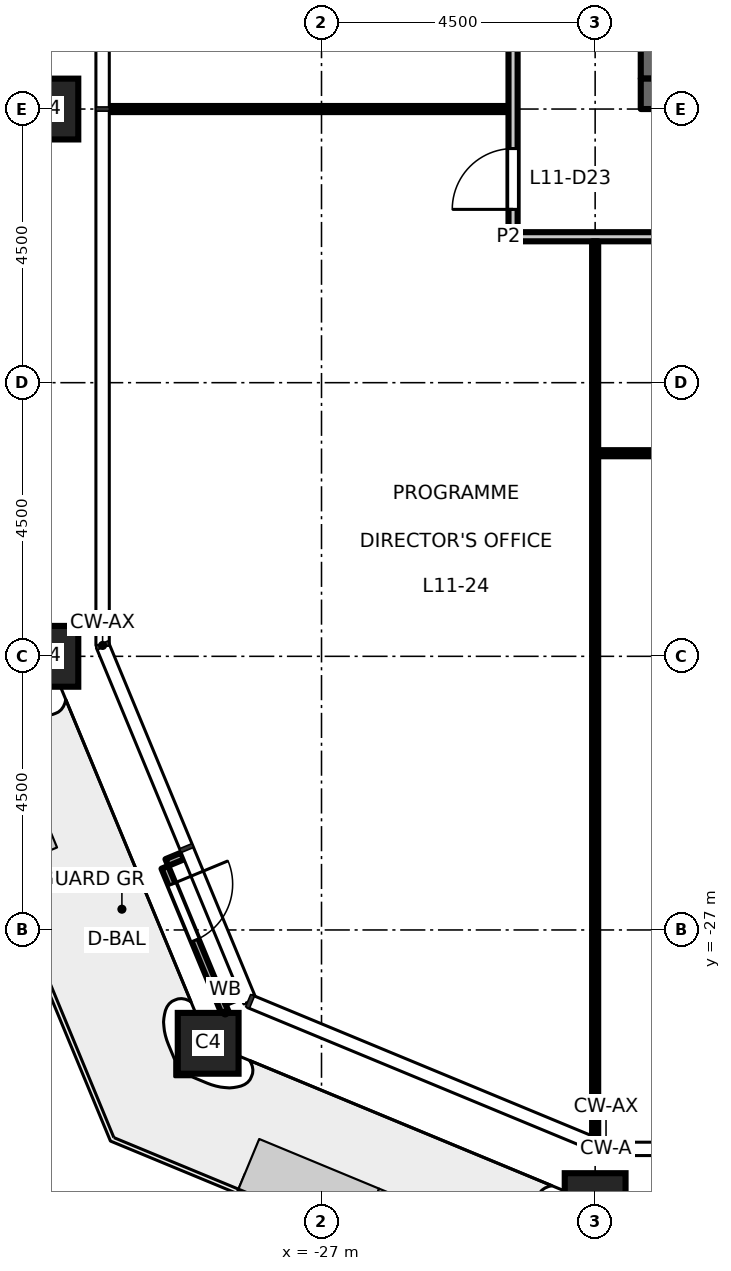
"""IFC4 building model, lengths in metres.
Left out: names, types, materials, properties, quantities, classifications, styles, units other than length and angle.
Written with IfcOpenShell. Run it as: python <this file> out.ifc"""

import sys

from ifc_helpers import new_model, si_unit, direction, frame, frame_2d, origin, origin_2d, place, context, subcontext, project, spatial, rectangle, hollow_rectangle, extrude, element, fill, save


model = new_model("IFC4")
c1 = context("Model", 3, precision=1e-05, world=origin(), true_north=direction((0.0, 1.0)))
c2 = subcontext(c1, "Body", "Model", "MODEL_VIEW")
j1 = project(units=[si_unit("LENGTHUNIT", "METRE"), si_unit("PLANEANGLEUNIT", "RADIAN")], contexts=[c1])
p1 = place(None, origin())
s1 = spatial("IfcSite", under=j1, at=p1, CompositionType="ELEMENT")
p2 = place(p1, origin())
s2 = spatial("IfcBuilding", under=s1, at=p2, CompositionType="ELEMENT")
p3 = place(p2, frame((0.0, 0.0, 53.7)))
s3 = spatial("IfcBuildingStorey", under=s2, at=p3, CompositionType="ELEMENT", Elevation=53.7)
for number, where, z_axis, x_axis in (
    (1, (-22.5, -31.5, 0.0), (0.0, 0.0, 1.0), (1.0, 0.0, 0.0)),
    (2, (-31.5, -13.5, 0.0), (0.0, 0.0, 1.0), (1.0, 0.0, 0.0)),
    (3, (-31.5, -22.5, 0.0), (0.0, 0.0, 1.0), (1.0, 0.0, 0.0)),
    (4, (-28.864, -28.864, 0.0), (0.0, 0.0, 1.0), (1.0, 0.0, 0.0)),
):
    element("IfcColumn", number, at=place(p3, frame(where, z_axis=z_axis, x_axis=x_axis)), inside=s3, PredefinedType="COLUMN", context=c2, shape_type="SweptSolid", body=[
        extrude(hollow_rectangle(XDim=1.0, YDim=1.0, WallThickness=0.06, at=origin_2d()), origin(), (0.0, 0.0, 1.0), 4.5),
    ])
p4 = place(p3, frame((-21.5, -13.0, 0.0), z_axis=(0.0, 0.0, 1.0), x_axis=(0.0, 1.0, 0.0)))
e5 = element("IfcWall", 5, at=p4, inside=s3, PredefinedType="SHEAR", context=c2, shape_type="SweptSolid", body=[
    extrude(rectangle(XDim=26.0, YDim=0.5, at=frame_2d((13.0, 0.0))), origin(), (0.0, 0.0, 1.0), 4.35),
])
p5 = place(p4, frame((16.825, 0.0, 0.0)))
e6 = element("IfcOpeningElement", 6, at=p5, cuts=e5, PredefinedType="OPENING", context=c2, shape_type="SweptSolid", body=[
    extrude(rectangle(XDim=1.8, YDim=2.1, at=frame_2d((0.9, 1.05))), frame((0.0, 0.26, 0.0), z_axis=(0.0, -1.0, 0.0), x_axis=(1.0, 0.0, 0.0)), (0.0, 0.0, 1.0), 0.52),
])
p6 = place(p4, frame((7.375, 0.0, 0.0)))
e7 = element("IfcOpeningElement", 7, at=p6, cuts=e5, PredefinedType="OPENING", context=c2, shape_type="SweptSolid", body=[
    extrude(rectangle(XDim=1.8, YDim=2.1, at=frame_2d((0.9, 1.05))), frame((0.0, 0.26, 0.0), z_axis=(0.0, -1.0, 0.0), x_axis=(1.0, 0.0, 0.0)), (0.0, 0.0, 1.0), 0.52),
])
p7 = place(p4, frame((23.4, 0.0, 0.0)))
e8 = element("IfcOpeningElement", 8, at=p7, cuts=e5, PredefinedType="OPENING", context=c2, shape_type="SweptSolid", body=[
    extrude(rectangle(XDim=0.9, YDim=2.1, at=frame_2d((0.45, 1.05))), frame((0.0, 0.26, 0.0), z_axis=(0.0, -1.0, 0.0), x_axis=(1.0, 0.0, 0.0)), (0.0, 0.0, 1.0), 0.52),
])
p8 = place(p3, frame((-8.25, -13.25, 0.0), z_axis=(0.0, 0.0, 1.0), x_axis=(-1.0, 0.0, 0.0)))
e9 = element("IfcWall", 9, at=p8, inside=s3, PredefinedType="SHEAR", context=c2, shape_type="SweptSolid", body=[
    extrude(rectangle(XDim=13.5, YDim=0.5, at=frame_2d((6.75, 0.0))), origin(), (0.0, 0.0, 1.0), 4.35),
])
p9 = place(p3, frame((-29.285, -25.783, 0.0), z_axis=(0.0, 0.0, 1.0), x_axis=(-0.923772220778, -0.382942403136, 0.0)))
e10 = element("IfcWall", 10, at=p9, inside=s3, PredefinedType="STANDARD", context=c2, shape_type="SweptSolid", body=[
    extrude(rectangle(XDim=0.28, YDim=0.12, at=frame_2d((0.14, 0.0))), origin(), (0.0, 0.0, 1.0), 4.35),
])
p10 = place(p3, frame((-28.343, -28.058, 0.0), z_axis=(0.0, 0.0, 1.0), x_axis=(-0.923899985553, -0.382634050621, 0.0)))
e11 = element("IfcWall", 11, at=p10, inside=s3, PredefinedType="STANDARD", context=c2, shape_type="SweptSolid", body=[
    extrude(rectangle(XDim=0.28, YDim=0.12, at=frame_2d((0.14, 0.0))), origin(), (0.0, 0.0, 1.0), 4.35),
])
p11 = place(p3, frame((-29.576, -25.969, 0.0), z_axis=(0.0, 0.0, 1.0), x_axis=(0.382648460137, -0.923894017707, 0.0)))
e12 = element("IfcWall", 12, at=p11, inside=s3, PredefinedType="STANDARD", context=c2, shape_type="SweptSolid", body=[
    extrude(rectangle(XDim=2.592, YDim=0.12, at=frame_2d((1.296, 0.0))), origin(), (0.0, 0.0, 1.0), 4.35),
])
p12 = place(p11, frame((0.3, 0.0, 0.0)))
e13 = element("IfcOpeningElement", 13, at=p12, cuts=e12, PredefinedType="OPENING", context=c2, shape_type="SweptSolid", body=[
    extrude(rectangle(XDim=1.0, YDim=2.4, at=frame_2d((0.5, 1.2))), frame((0.0, 0.07, 0.0), z_axis=(0.0, -1.0, 0.0), x_axis=(1.0, 0.0, 0.0)), (0.0, 0.0, 1.0), 0.14),
])
p13 = place(p3, frame((-22.45, -19.16, 0.0), z_axis=(0.0, 0.0, 1.0), x_axis=(1.0, 0.0, 0.0)))
e14 = element("IfcWall", 14, at=p13, inside=s3, PredefinedType="PARTITIONING", context=c2, shape_type="SweptSolid", body=[
    extrude(rectangle(XDim=8.9, YDim=0.1, at=frame_2d((4.45, 0.0))), origin(), (0.0, 0.0, 1.0), 4.35),
])
p14 = place(p13, frame((3.85, 0.0, 0.0)))
e15 = element("IfcOpeningElement", 15, at=p14, cuts=e14, PredefinedType="OPENING", context=c2, shape_type="SweptSolid", body=[
    extrude(rectangle(XDim=1.0, YDim=2.1, at=frame_2d((0.5, 1.05))), frame((0.0, 0.06, 0.0), z_axis=(0.0, -1.0, 0.0), x_axis=(1.0, 0.0, 0.0)), (0.0, 0.0, 1.0), 0.12),
])
p15 = place(p3, frame((-23.925, -15.6, 0.0), z_axis=(0.0, 0.0, 1.0), x_axis=(1.0, 0.0, 0.0)))
e16 = element("IfcWall", 16, at=p15, inside=s3, PredefinedType="PARTITIONING", context=c2, shape_type="SweptSolid", body=[
    extrude(rectangle(XDim=47.85, YDim=0.15, at=frame_2d((23.925, 0.0))), origin(), (0.0, 0.0, 1.0), 4.35),
])
p16 = place(p15, frame((5.325, 0.0, 0.0)))
e17 = element("IfcOpeningElement", 17, at=p16, cuts=e16, PredefinedType="OPENING", context=c2, shape_type="SweptSolid", body=[
    extrude(rectangle(XDim=1.0, YDim=2.1, at=frame_2d((0.5, 1.05))), frame((0.0, 0.085, 0.0), z_axis=(0.0, -1.0, 0.0), x_axis=(1.0, 0.0, 0.0)), (0.0, 0.0, 1.0), 0.17),
])
p17 = place(p15, frame((14.325, 0.0, 0.0)))
e18 = element("IfcOpeningElement", 18, at=p17, cuts=e16, PredefinedType="OPENING", context=c2, shape_type="SweptSolid", body=[
    extrude(rectangle(XDim=1.0, YDim=2.1, at=frame_2d((0.5, 1.05))), frame((0.0, 0.085, 0.0), z_axis=(0.0, -1.0, 0.0), x_axis=(1.0, 0.0, 0.0)), (0.0, 0.0, 1.0), 0.17),
])
p18 = place(p15, frame((23.325, 0.0, 0.0)))
e19 = element("IfcOpeningElement", 19, at=p18, cuts=e16, PredefinedType="OPENING", context=c2, shape_type="SweptSolid", body=[
    extrude(rectangle(XDim=1.0, YDim=2.1, at=frame_2d((0.5, 1.05))), frame((0.0, 0.085, 0.0), z_axis=(0.0, -1.0, 0.0), x_axis=(1.0, 0.0, 0.0)), (0.0, 0.0, 1.0), 0.17),
])
p19 = place(p15, frame((32.325, 0.0, 0.0)))
e20 = element("IfcOpeningElement", 20, at=p19, cuts=e16, PredefinedType="OPENING", context=c2, shape_type="SweptSolid", body=[
    extrude(rectangle(XDim=1.0, YDim=2.1, at=frame_2d((0.5, 1.05))), frame((0.0, 0.085, 0.0), z_axis=(0.0, -1.0, 0.0), x_axis=(1.0, 0.0, 0.0)), (0.0, 0.0, 1.0), 0.17),
])
p20 = place(p15, frame((41.325, 0.0, 0.0)))
e21 = element("IfcOpeningElement", 21, at=p20, cuts=e16, PredefinedType="OPENING", context=c2, shape_type="SweptSolid", body=[
    extrude(rectangle(XDim=1.0, YDim=2.1, at=frame_2d((0.5, 1.05))), frame((0.0, 0.085, 0.0), z_axis=(0.0, -1.0, 0.0), x_axis=(1.0, 0.0, 0.0)), (0.0, 0.0, 1.0), 0.17),
])
p21 = place(p3, frame((-30.51, -13.5, 0.0), z_axis=(0.0, 0.0, 1.0), x_axis=(1.0, 0.0, 0.0)))
e22 = element("IfcWall", 22, at=p21, inside=s3, PredefinedType="PARTITIONING", context=c2, shape_type="SweptSolid", body=[
    extrude(rectangle(XDim=6.585, YDim=0.1, at=frame_2d((3.292, 0.0))), origin(), (0.0, 0.0, 1.0), 3.35),
])
p22 = place(p3, frame((-23.85, -15.525, 0.0), z_axis=(0.0, 0.0, 1.0), x_axis=(0.0, 1.0, 0.0)))
e23 = element("IfcWall", 23, at=p22, inside=s3, PredefinedType="PARTITIONING", context=c2, shape_type="SweptSolid", body=[
    extrude(rectangle(XDim=31.05, YDim=0.15, at=frame_2d((15.525, 0.0))), origin(), (0.0, 0.0, 1.0), 4.35),
])
p23 = place(p22, frame((29.475, 0.0, 0.0)))
e24 = element("IfcOpeningElement", 24, at=p23, cuts=e23, PredefinedType="OPENING", context=c2, shape_type="SweptSolid", body=[
    extrude(rectangle(XDim=1.0, YDim=2.1, at=frame_2d((0.5, 1.05))), frame((0.0, 0.085, 0.0), z_axis=(0.0, -1.0, 0.0), x_axis=(1.0, 0.0, 0.0)), (0.0, 0.0, 1.0), 0.17),
])
p24 = place(p22, frame((0.375, 0.0, 0.0)))
e25 = element("IfcOpeningElement", 25, at=p24, cuts=e23, PredefinedType="OPENING", context=c2, shape_type="SweptSolid", body=[
    extrude(rectangle(XDim=1.0, YDim=2.1, at=frame_2d((0.5, 1.05))), frame((0.0, 0.085, 0.0), z_axis=(0.0, -1.0, 0.0), x_axis=(1.0, 0.0, 0.0)), (0.0, 0.0, 1.0), 0.17),
])
p25 = place(p22, frame((6.125, 0.0, 0.0)))
e26 = element("IfcOpeningElement", 26, at=p25, cuts=e23, PredefinedType="OPENING", context=c2, shape_type="SweptSolid", body=[
    extrude(rectangle(XDim=1.0, YDim=2.1, at=frame_2d((0.5, 1.05))), frame((0.0, 0.085, 0.0), z_axis=(0.0, -1.0, 0.0), x_axis=(1.0, 0.0, 0.0)), (0.0, 0.0, 1.0), 0.17),
])
p26 = place(p22, frame((15.125, 0.0, 0.0)))
e27 = element("IfcOpeningElement", 27, at=p26, cuts=e23, PredefinedType="OPENING", context=c2, shape_type="SweptSolid", body=[
    extrude(rectangle(XDim=1.0, YDim=2.1, at=frame_2d((0.5, 1.05))), frame((0.0, 0.085, 0.0), z_axis=(0.0, -1.0, 0.0), x_axis=(1.0, 0.0, 0.0)), (0.0, 0.0, 1.0), 0.17),
])
p27 = place(p22, frame((24.125, 0.0, 0.0)))
e28 = element("IfcOpeningElement", 28, at=p27, cuts=e23, PredefinedType="OPENING", context=c2, shape_type="SweptSolid", body=[
    extrude(rectangle(XDim=1.0, YDim=2.1, at=frame_2d((0.5, 1.05))), frame((0.0, 0.085, 0.0), z_axis=(0.0, -1.0, 0.0), x_axis=(1.0, 0.0, 0.0)), (0.0, 0.0, 1.0), 0.17),
])
p28 = place(p3, frame((-22.5, -30.428, 0.0), z_axis=(0.0, 0.0, 1.0), x_axis=(0.0, 1.0, 0.0)))
e29 = element("IfcWall", 29, at=p28, inside=s3, PredefinedType="PARTITIONING", context=c2, shape_type="SweptSolid", body=[
    extrude(rectangle(XDim=14.753, YDim=0.1, at=frame_2d((7.376, 0.0))), origin(), (0.0, 0.0, 1.0), 3.35),
])
p29 = place(p12, origin())
e30 = element("IfcDoor", 30, at=p29, inside=s3, OperationType="SINGLE_SWING_LEFT", PredefinedType="DOOR", context=c2, shape_type="SweptSolid", body=[
    extrude(rectangle(XDim=1.0, YDim=2.4, at=frame_2d((0.5, 1.2))), frame((0.0, 0.025, 0.0), z_axis=(0.0, -1.0, 0.0), x_axis=(1.0, 0.0, 0.0)), (0.0, 0.0, 1.0), 0.05),
])
fill(e13, e30)
p30 = place(p24, origin())
e31 = element("IfcDoor", 31, at=p30, inside=s3, OperationType="SINGLE_SWING_LEFT", PredefinedType="DOOR", context=c2, shape_type="SweptSolid", body=[
    extrude(rectangle(XDim=1.0, YDim=2.1, at=frame_2d((0.5, 1.05))), frame((0.0, 0.025, 0.0), z_axis=(0.0, -1.0, 0.0), x_axis=(1.0, 0.0, 0.0)), (0.0, 0.0, 1.0), 0.05),
])
fill(e25, e31)
save(model, sys.argv[1])
